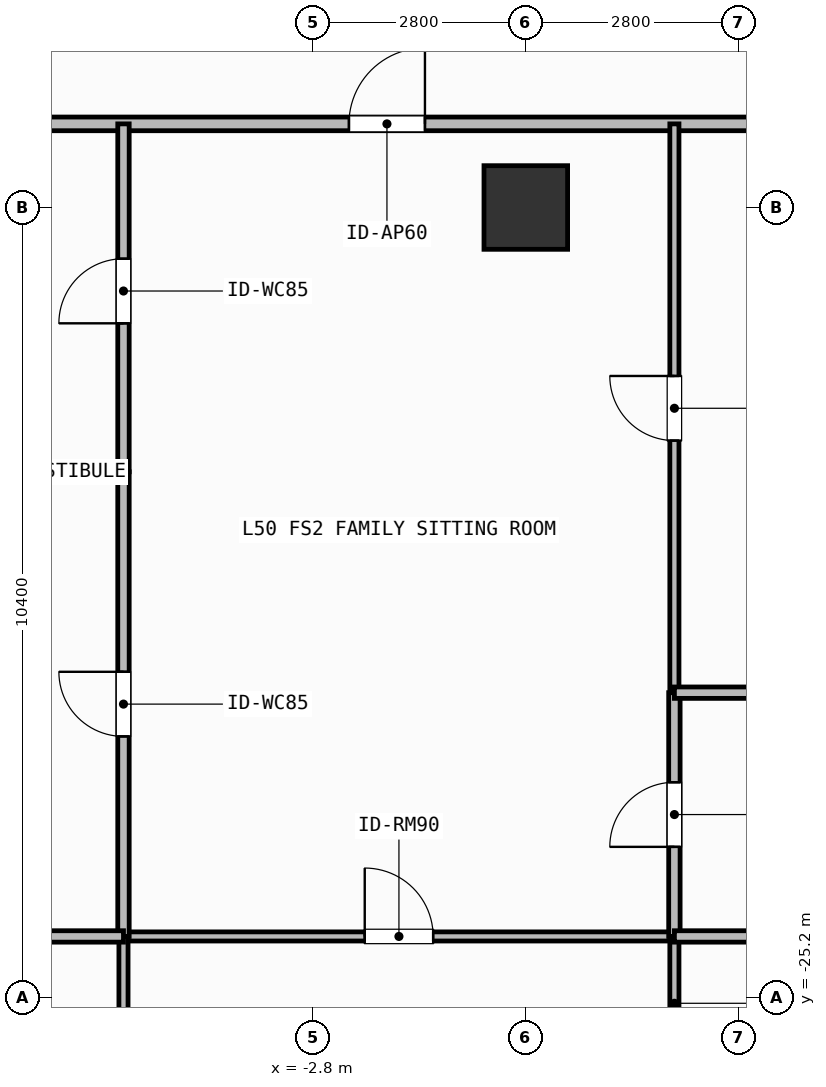
"""IFC4 building model, lengths in metres.
Left out: names, types, materials, properties, quantities, classifications, styles, units other than length and angle.
Written with IfcOpenShell. Run it as: python <this file> out.ifc"""

import sys

from ifc_helpers import new_model, si_unit, direction, frame, frame_2d, origin, origin_2d, place, context, subcontext, project, spatial, rectangle, extrude, element, fill, save


model = new_model("IFC4")
c1 = context("Model", 3, precision=1e-05, world=origin(), true_north=direction((0.0, 1.0)))
c2 = subcontext(c1, "Body", "Model", "MODEL_VIEW")
j1 = project(units=[si_unit("LENGTHUNIT", "METRE"), si_unit("PLANEANGLEUNIT", "RADIAN")], contexts=[c1])
p1 = place(None, origin())
s1 = spatial("IfcSite", under=j1, at=p1, CompositionType="ELEMENT")
p2 = place(p1, origin())
s2 = spatial("IfcBuilding", under=s1, at=p2, CompositionType="ELEMENT")
p3 = place(p2, frame((0.0, 0.0, 203.1)))
s3 = spatial("IfcBuildingStorey", under=s2, at=p3, CompositionType="ELEMENT", Elevation=203.1)
p4 = place(p3, frame((0.0, -14.8, 0.0), z_axis=(0.0, 0.0, 1.0), x_axis=(1.0, 0.0, 0.0)))
e1 = element("IfcColumn", 1, at=p4, inside=s3, PredefinedType="COLUMN", context=c2, shape_type="SweptSolid", body=[
    extrude(rectangle(XDim=1.1, YDim=1.1, at=origin_2d()), origin(), (0.0, 0.0, 1.0), 3.9),
])
p5 = place(p3, frame((-10.855, -13.7, 0.0), z_axis=(0.0, 0.0, 1.0), x_axis=(1.0, 0.0, 0.0)))
e2 = element("IfcWall", 2, at=p5, inside=s3, PredefinedType="PARTITIONING", context=c2, shape_type="SweptSolid", body=[
    extrude(rectangle(XDim=16.454, YDim=0.18, at=frame_2d((8.227, 0.0))), origin(), (0.0, 0.0, 1.0), 3.68),
])
p6 = place(p5, frame((8.528, 0.0, 0.0)))
e3 = element("IfcOpeningElement", 3, at=p6, cuts=e2, PredefinedType="OPENING", context=c2, shape_type="SweptSolid", body=[
    extrude(rectangle(XDim=1.0, YDim=2.2, at=frame_2d((0.5, 1.1))), frame((0.0, 0.1, 0.0), z_axis=(0.0, -1.0, 0.0), x_axis=(1.0, 0.0, 0.0)), (0.0, 0.0, 1.0), 0.2),
])
p7 = place(p3, frame((-5.293, -24.39, 0.0), z_axis=(0.0, 0.0, 1.0), x_axis=(1.0, 0.0, 0.0)))
e4 = element("IfcWall", 4, at=p7, inside=s3, PredefinedType="PARTITIONING", context=c2, shape_type="SweptSolid", body=[
    extrude(rectangle(XDim=7.248, YDim=0.12, at=frame_2d((3.624, 0.0))), origin(), (0.0, 0.0, 1.0), 3.68),
])
p8 = place(p7, frame((3.174, 0.0, 0.0)))
e5 = element("IfcOpeningElement", 5, at=p8, cuts=e4, PredefinedType="OPENING", context=c2, shape_type="SweptSolid", body=[
    extrude(rectangle(XDim=0.9, YDim=2.1, at=frame_2d((0.45, 1.05))), frame((0.0, 0.07, 0.0), z_axis=(0.0, -1.0, 0.0), x_axis=(1.0, 0.0, 0.0)), (0.0, 0.0, 1.0), 0.14),
])
p9 = place(p3, frame((-5.293, -24.39, 0.0), z_axis=(0.0, 0.0, 1.0), x_axis=(0.0, 1.0, 0.0)))
e6 = element("IfcWall", 6, at=p9, inside=s3, PredefinedType="PARTITIONING", context=c2, shape_type="SweptSolid", body=[
    extrude(rectangle(XDim=6.113, YDim=0.15, at=frame_2d((3.056, 0.0))), origin(), (0.0, 0.0, 1.0), 3.68),
])
p10 = place(p9, frame((2.632, 0.0, 0.0)))
e7 = element("IfcOpeningElement", 7, at=p10, cuts=e6, PredefinedType="OPENING", context=c2, shape_type="SweptSolid", body=[
    extrude(rectangle(XDim=0.85, YDim=2.1, at=frame_2d((0.425, 1.05))), frame((0.0, 0.085, 0.0), z_axis=(0.0, -1.0, 0.0), x_axis=(1.0, 0.0, 0.0)), (0.0, 0.0, 1.0), 0.17),
])
p11 = place(p3, frame((-5.293, -18.277, 0.0), z_axis=(0.0, 0.0, 1.0), x_axis=(0.0, 1.0, 0.0)))
e8 = element("IfcWall", 8, at=p11, inside=s3, PredefinedType="PARTITIONING", context=c2, shape_type="SweptSolid", body=[
    extrude(rectangle(XDim=4.577, YDim=0.15, at=frame_2d((2.289, 0.0))), origin(), (0.0, 0.0, 1.0), 3.68),
])
p12 = place(p11, frame((1.953, 0.0, 0.0)))
e9 = element("IfcOpeningElement", 9, at=p12, cuts=e8, PredefinedType="OPENING", context=c2, shape_type="SweptSolid", body=[
    extrude(rectangle(XDim=0.85, YDim=2.1, at=frame_2d((0.425, 1.05))), frame((0.0, 0.085, 0.0), z_axis=(0.0, -1.0, 0.0), x_axis=(1.0, 0.0, 0.0)), (0.0, 0.0, 1.0), 0.17),
])
p13 = place(p3, frame((-5.293, -28.63, 0.0), z_axis=(0.0, 0.0, 1.0), x_axis=(0.0, 1.0, 0.0)))
e10 = element("IfcWall", 10, at=p13, inside=s3, PredefinedType="PARTITIONING", context=c2, shape_type="SweptSolid", body=[
    extrude(rectangle(XDim=4.24, YDim=0.12, at=frame_2d((2.12, 0.0))), origin(), (0.0, 0.0, 1.0), 3.68),
])
p14 = place(p13, frame((1.581, 0.0, 0.0)))
e11 = element("IfcOpeningElement", 11, at=p14, cuts=e10, PredefinedType="OPENING", context=c2, shape_type="SweptSolid", body=[
    extrude(rectangle(XDim=0.9, YDim=2.1, at=frame_2d((0.45, 1.05))), frame((0.0, 0.07, 0.0), z_axis=(0.0, -1.0, 0.0), x_axis=(1.0, 0.0, 0.0)), (0.0, 0.0, 1.0), 0.14),
])
p15 = place(p3, frame((1.955, -24.39, 0.0), z_axis=(0.0, 0.0, 1.0), x_axis=(0.0, 1.0, 0.0)))
e12 = element("IfcWall", 12, at=p15, inside=s3, PredefinedType="PARTITIONING", context=c2, shape_type="SweptSolid", body=[
    extrude(rectangle(XDim=3.207, YDim=0.15, at=frame_2d((1.604, 0.0))), origin(), (0.0, 0.0, 1.0), 3.68),
])
p16 = place(p15, frame((1.178, 0.0, 0.0)))
e13 = element("IfcOpeningElement", 13, at=p16, cuts=e12, PredefinedType="OPENING", context=c2, shape_type="SweptSolid", body=[
    extrude(rectangle(XDim=0.85, YDim=2.1, at=frame_2d((0.425, 1.05))), frame((0.0, 0.085, 0.0), z_axis=(0.0, -1.0, 0.0), x_axis=(1.0, 0.0, 0.0)), (0.0, 0.0, 1.0), 0.17),
])
p17 = place(p3, frame((1.955, -21.183, 0.0), z_axis=(0.0, 0.0, 1.0), x_axis=(0.0, 1.0, 0.0)))
e14 = element("IfcWall", 14, at=p17, inside=s3, PredefinedType="PARTITIONING", context=c2, shape_type="SweptSolid", body=[
    extrude(rectangle(XDim=7.483, YDim=0.12, at=frame_2d((3.742, 0.0))), origin(), (0.0, 0.0, 1.0), 3.68),
])
p18 = place(p17, frame((3.316, 0.0, 0.0)))
e15 = element("IfcOpeningElement", 15, at=p18, cuts=e14, PredefinedType="OPENING", context=c2, shape_type="SweptSolid", body=[
    extrude(rectangle(XDim=0.85, YDim=2.1, at=frame_2d((0.425, 1.05))), frame((0.0, 0.07, 0.0), z_axis=(0.0, -1.0, 0.0), x_axis=(1.0, 0.0, 0.0)), (0.0, 0.0, 1.0), 0.14),
])
p19 = place(p3, frame((1.955, -28.63, 0.0), z_axis=(0.0, 0.0, 1.0), x_axis=(0.0, 1.0, 0.0)))
e16 = element("IfcWall", 16, at=p19, inside=s3, PredefinedType="PARTITIONING", context=c2, shape_type="SweptSolid", body=[
    extrude(rectangle(XDim=4.24, YDim=0.12, at=frame_2d((2.12, 0.0))), origin(), (0.0, 0.0, 1.0), 3.68),
])
p20 = place(p19, frame((1.581, 0.0, 0.0)))
e17 = element("IfcOpeningElement", 17, at=p20, cuts=e16, PredefinedType="OPENING", context=c2, shape_type="SweptSolid", body=[
    extrude(rectangle(XDim=0.9, YDim=2.1, at=frame_2d((0.45, 1.05))), frame((0.0, 0.07, 0.0), z_axis=(0.0, -1.0, 0.0), x_axis=(1.0, 0.0, 0.0)), (0.0, 0.0, 1.0), 0.14),
])
for number, where, z_axis, x_axis in (
    (18, (-10.855, -18.277, 0.0), (0.0, 0.0, 1.0), (1.0, 0.0, 0.0)),
    (19, (-10.855, -24.39, 0.0), (0.0, 0.0, 1.0), (1.0, 0.0, 0.0)),
):
    element("IfcWall", number, at=place(p3, frame(where, z_axis=z_axis, x_axis=x_axis)), inside=s3, PredefinedType="PARTITIONING", context=c2, shape_type="SweptSolid", body=[
        extrude(rectangle(XDim=5.562, YDim=0.15, at=frame_2d((2.781, 0.0))), origin(), (0.0, 0.0, 1.0), 3.68),
    ])
for number, where, z_axis, x_axis in (
    (20, (1.955, -21.183, 0.0), (0.0, 0.0, 1.0), (1.0, 0.0, 0.0)),
    (21, (1.955, -24.39, 0.0), (0.0, 0.0, 1.0), (1.0, 0.0, 0.0)),
):
    element("IfcWall", number, at=place(p3, frame(where, z_axis=z_axis, x_axis=x_axis)), inside=s3, PredefinedType="PARTITIONING", context=c2, shape_type="SweptSolid", body=[
        extrude(rectangle(XDim=3.644, YDim=0.15, at=frame_2d((1.822, 0.0))), origin(), (0.0, 0.0, 1.0), 3.68),
    ])
p21 = place(p6, origin())
e22 = element("IfcDoor", 22, at=p21, inside=s3, OperationType="SINGLE_SWING_RIGHT", PredefinedType="DOOR", context=c2, shape_type="SweptSolid", body=[
    extrude(rectangle(XDim=1.0, YDim=2.2, at=frame_2d((0.5, 1.1))), frame((0.0, 0.025, 0.0), z_axis=(0.0, -1.0, 0.0), x_axis=(1.0, 0.0, 0.0)), (0.0, 0.0, 1.0), 0.05),
])
fill(e3, e22)
p22 = place(p8, origin())
e23 = element("IfcDoor", 23, at=p22, inside=s3, OperationType="SINGLE_SWING_LEFT", PredefinedType="DOOR", context=c2, shape_type="SweptSolid", body=[
    extrude(rectangle(XDim=0.9, YDim=2.1, at=frame_2d((0.45, 1.05))), frame((0.0, 0.025, 0.0), z_axis=(0.0, -1.0, 0.0), x_axis=(1.0, 0.0, 0.0)), (0.0, 0.0, 1.0), 0.05),
])
fill(e5, e23)
p23 = place(p10, origin())
e24 = element("IfcDoor", 24, at=p23, inside=s3, OperationType="SINGLE_SWING_RIGHT", PredefinedType="DOOR", context=c2, shape_type="SweptSolid", body=[
    extrude(rectangle(XDim=0.85, YDim=2.1, at=frame_2d((0.425, 1.05))), frame((0.0, 0.025, 0.0), z_axis=(0.0, -1.0, 0.0), x_axis=(1.0, 0.0, 0.0)), (0.0, 0.0, 1.0), 0.05),
])
fill(e7, e24)
p24 = place(p12, origin())
e25 = element("IfcDoor", 25, at=p24, inside=s3, OperationType="SINGLE_SWING_LEFT", PredefinedType="DOOR", context=c2, shape_type="SweptSolid", body=[
    extrude(rectangle(XDim=0.85, YDim=2.1, at=frame_2d((0.425, 1.05))), frame((0.0, 0.025, 0.0), z_axis=(0.0, -1.0, 0.0), x_axis=(1.0, 0.0, 0.0)), (0.0, 0.0, 1.0), 0.05),
])
fill(e9, e25)
p25 = place(p16, origin())
e26 = element("IfcDoor", 26, at=p25, inside=s3, OperationType="SINGLE_SWING_LEFT", PredefinedType="DOOR", context=c2, shape_type="SweptSolid", body=[
    extrude(rectangle(XDim=0.85, YDim=2.1, at=frame_2d((0.425, 1.05))), frame((0.0, 0.025, 0.0), z_axis=(0.0, -1.0, 0.0), x_axis=(1.0, 0.0, 0.0)), (0.0, 0.0, 1.0), 0.05),
])
fill(e13, e26)
p26 = place(p18, origin())
e27 = element("IfcDoor", 27, at=p26, inside=s3, OperationType="SINGLE_SWING_RIGHT", PredefinedType="DOOR", context=c2, shape_type="SweptSolid", body=[
    extrude(rectangle(XDim=0.85, YDim=2.1, at=frame_2d((0.425, 1.05))), frame((0.0, 0.025, 0.0), z_axis=(0.0, -1.0, 0.0), x_axis=(1.0, 0.0, 0.0)), (0.0, 0.0, 1.0), 0.05),
])
fill(e15, e27)
save(model, sys.argv[1])
